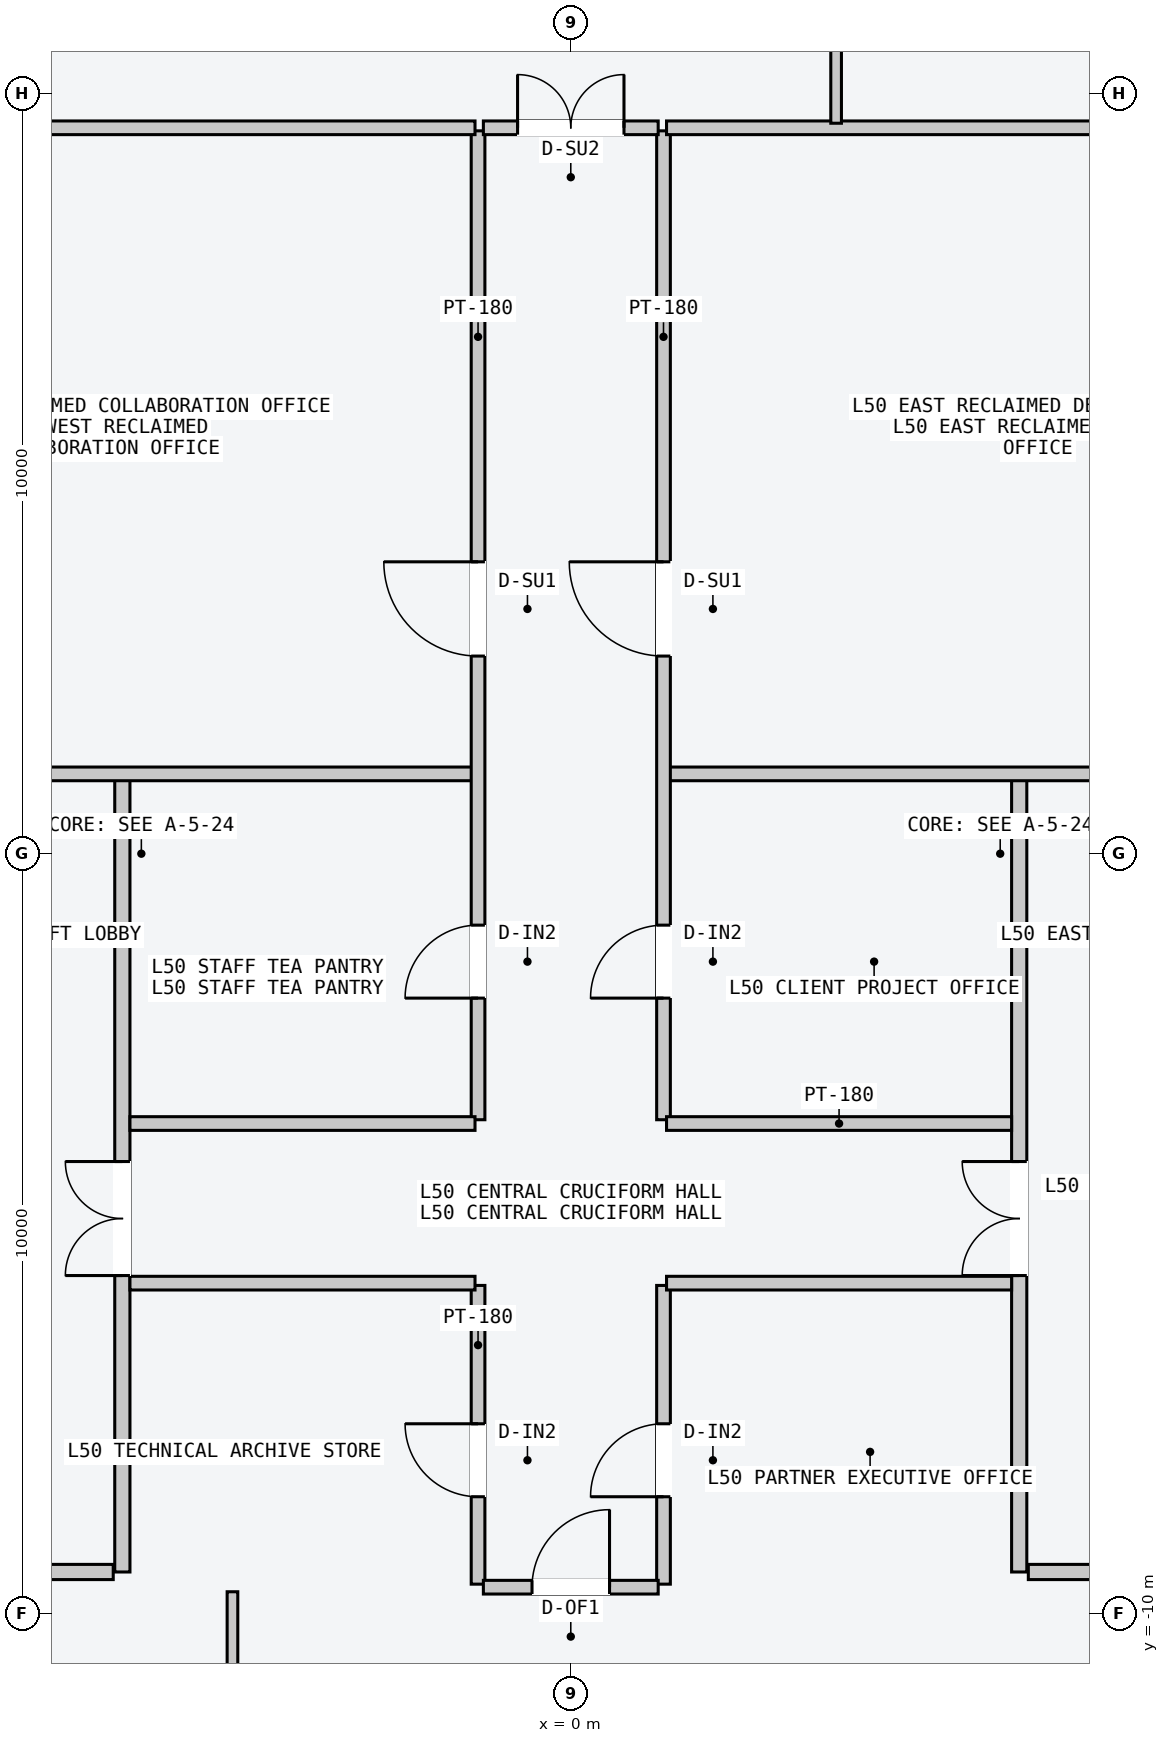
"""IFC4 building model, lengths in metres.
Left out: names, types, materials, properties, quantities, classifications, styles, units other than length and angle.
Written with IfcOpenShell. Run it as: python <this file> out.ifc"""

import sys

from ifc_helpers import new_model, si_unit, direction, frame, frame_2d, origin, place, context, subcontext, project, spatial, rectangle, extrude, element, fill, save


model = new_model("IFC4")
c1 = context("Model", 3, precision=1e-05, world=origin(), true_north=direction((0.0, 1.0)))
c2 = subcontext(c1, "Body", "Model", "MODEL_VIEW")
j1 = project(units=[si_unit("LENGTHUNIT", "METRE"), si_unit("PLANEANGLEUNIT", "RADIAN")], contexts=[c1])
p1 = place(None, origin())
s1 = spatial("IfcSite", under=j1, at=p1, CompositionType="ELEMENT")
p2 = place(p1, origin())
s2 = spatial("IfcBuilding", under=s1, at=p2, CompositionType="ELEMENT")
p3 = place(p2, frame((0.0, 0.0, 191.1)))
s3 = spatial("IfcBuildingStorey", under=s2, at=p3, CompositionType="ELEMENT", Elevation=191.1)
p4 = place(p3, frame((-5.9, -9.45, 0.0), z_axis=(0.0, 0.0, 1.0), x_axis=(0.0, 1.0, 0.0)))
e1 = element("IfcWall", 1, at=p4, inside=s3, PredefinedType="PARTITIONING", context=c2, shape_type="SweptSolid", body=[
    extrude(rectangle(XDim=10.5, YDim=0.2, at=frame_2d((5.25, 0.0))), origin(), (0.0, 0.0, 1.0), 3.4),
])
p5 = place(p4, frame((3.9, 0.0, 0.0)))
e2 = element("IfcOpeningElement", 2, at=p5, cuts=e1, PredefinedType="OPENING", context=c2, shape_type="SweptSolid", body=[
    extrude(rectangle(XDim=1.5, YDim=2.2, at=frame_2d((0.75, 1.1))), frame((0.0, 0.11, 0.0), z_axis=(0.0, -1.0, 0.0), x_axis=(1.0, 0.0, 0.0)), (0.0, 0.0, 1.0), 0.22),
])
p6 = place(p3, frame((-6.02, -9.45, 0.0), z_axis=(0.0, 0.0, 1.0), x_axis=(-1.0, 0.0, 0.0)))
e3 = element("IfcWall", 3, at=p6, inside=s3, PredefinedType="PARTITIONING", context=c2, shape_type="SweptSolid", body=[
    extrude(rectangle(XDim=1.8, YDim=0.2, at=frame_2d((0.9, 0.0))), origin(), (0.0, 0.0, 1.0), 3.4),
])
p7 = place(p3, frame((5.9, -9.45, 0.0), z_axis=(0.0, 0.0, 1.0), x_axis=(0.0, 1.0, 0.0)))
e4 = element("IfcWall", 4, at=p7, inside=s3, PredefinedType="PARTITIONING", context=c2, shape_type="SweptSolid", body=[
    extrude(rectangle(XDim=10.5, YDim=0.2, at=frame_2d((5.25, 0.0))), origin(), (0.0, 0.0, 1.0), 3.4),
])
p8 = place(p7, frame((3.9, 0.0, 0.0)))
e5 = element("IfcOpeningElement", 5, at=p8, cuts=e4, PredefinedType="OPENING", context=c2, shape_type="SweptSolid", body=[
    extrude(rectangle(XDim=1.5, YDim=2.2, at=frame_2d((0.75, 1.1))), frame((0.0, 0.11, 0.0), z_axis=(0.0, -1.0, 0.0), x_axis=(1.0, 0.0, 0.0)), (0.0, 0.0, 1.0), 0.22),
])
p9 = place(p3, frame((6.02, -9.45, 0.0), z_axis=(0.0, 0.0, 1.0), x_axis=(1.0, 0.0, 0.0)))
e6 = element("IfcWall", 6, at=p9, inside=s3, PredefinedType="PARTITIONING", context=c2, shape_type="SweptSolid", body=[
    extrude(rectangle(XDim=1.8, YDim=0.2, at=frame_2d((0.9, 0.0))), origin(), (0.0, 0.0, 1.0), 3.4),
])
p10 = place(p3, frame((-10.05, 1.05, 0.0), z_axis=(0.0, 0.0, 1.0), x_axis=(1.0, 0.0, 0.0)))
e7 = element("IfcWall", 7, at=p10, inside=s3, PredefinedType="PARTITIONING", context=c2, shape_type="SweptSolid", body=[
    extrude(rectangle(XDim=8.79, YDim=0.18, at=frame_2d((4.395, 0.0))), origin(), (0.0, 0.0, 1.0), 3.4),
])
p11 = place(p3, frame((-1.22, -3.5, 0.0), z_axis=(0.0, 0.0, 1.0), x_axis=(0.0, 1.0, 0.0)))
e8 = element("IfcWall", 8, at=p11, inside=s3, PredefinedType="PARTITIONING", context=c2, shape_type="SweptSolid", body=[
    extrude(rectangle(XDim=13.01, YDim=0.18, at=frame_2d((6.505, 0.0))), origin(), (0.0, 0.0, 1.0), 3.4),
])
p12 = place(p11, frame((6.1, 0.0, 0.0)))
e9 = element("IfcOpeningElement", 9, at=p12, cuts=e8, PredefinedType="OPENING", context=c2, shape_type="SweptSolid", body=[
    extrude(rectangle(XDim=1.24, YDim=2.24, at=frame_2d((0.62, 1.12))), frame((0.0, 0.1, 0.0), z_axis=(0.0, -1.0, 0.0), x_axis=(1.0, 0.0, 0.0)), (0.0, 0.0, 1.0), 0.2),
])
p13 = place(p11, frame((1.6, 0.0, 0.0)))
e10 = element("IfcOpeningElement", 10, at=p13, cuts=e8, PredefinedType="OPENING", context=c2, shape_type="SweptSolid", body=[
    extrude(rectangle(XDim=0.96, YDim=2.18, at=frame_2d((0.48, 1.09))), frame((0.0, 0.1, 0.0), z_axis=(0.0, -1.0, 0.0), x_axis=(1.0, 0.0, 0.0)), (0.0, 0.0, 1.0), 0.2),
])
p14 = place(p3, frame((-7.5, 9.55, 0.0), z_axis=(0.0, 0.0, 1.0), x_axis=(1.0, 0.0, 0.0)))
e11 = element("IfcWall", 11, at=p14, inside=s3, PredefinedType="PARTITIONING", context=c2, shape_type="SweptSolid", body=[
    extrude(rectangle(XDim=6.24, YDim=0.18, at=frame_2d((3.12, 0.0))), origin(), (0.0, 0.0, 1.0), 3.4),
])
p15 = place(p3, frame((-5.8, -3.55, 0.0), z_axis=(0.0, 0.0, 1.0), x_axis=(1.0, 0.0, 0.0)))
e12 = element("IfcWall", 12, at=p15, inside=s3, PredefinedType="PARTITIONING", context=c2, shape_type="SweptSolid", body=[
    extrude(rectangle(XDim=4.54, YDim=0.18, at=frame_2d((2.27, 0.0))), origin(), (0.0, 0.0, 1.0), 3.4),
])
p16 = place(p3, frame((1.26, 1.05, 0.0), z_axis=(0.0, 0.0, 1.0), x_axis=(1.0, 0.0, 0.0)))
e13 = element("IfcWall", 13, at=p16, inside=s3, PredefinedType="PARTITIONING", context=c2, shape_type="SweptSolid", body=[
    extrude(rectangle(XDim=8.8, YDim=0.18, at=frame_2d((4.4, 0.0))), origin(), (0.0, 0.0, 1.0), 3.4),
])
p17 = place(p3, frame((1.22, -3.5, 0.0), z_axis=(0.0, 0.0, 1.0), x_axis=(0.0, 1.0, 0.0)))
e14 = element("IfcWall", 14, at=p17, inside=s3, PredefinedType="PARTITIONING", context=c2, shape_type="SweptSolid", body=[
    extrude(rectangle(XDim=13.01, YDim=0.18, at=frame_2d((6.505, 0.0))), origin(), (0.0, 0.0, 1.0), 3.4),
])
p18 = place(p17, frame((6.1, 0.0, 0.0)))
e15 = element("IfcOpeningElement", 15, at=p18, cuts=e14, PredefinedType="OPENING", context=c2, shape_type="SweptSolid", body=[
    extrude(rectangle(XDim=1.24, YDim=2.24, at=frame_2d((0.62, 1.12))), frame((0.0, 0.1, 0.0), z_axis=(0.0, -1.0, 0.0), x_axis=(1.0, 0.0, 0.0)), (0.0, 0.0, 1.0), 0.2),
])
p19 = place(p17, frame((1.6, 0.0, 0.0)))
e16 = element("IfcOpeningElement", 16, at=p19, cuts=e14, PredefinedType="OPENING", context=c2, shape_type="SweptSolid", body=[
    extrude(rectangle(XDim=0.96, YDim=2.18, at=frame_2d((0.48, 1.09))), frame((0.0, 0.1, 0.0), z_axis=(0.0, -1.0, 0.0), x_axis=(1.0, 0.0, 0.0)), (0.0, 0.0, 1.0), 0.2),
])
p20 = place(p3, frame((1.26, 9.55, 0.0), z_axis=(0.0, 0.0, 1.0), x_axis=(1.0, 0.0, 0.0)))
e17 = element("IfcWall", 17, at=p20, inside=s3, PredefinedType="PARTITIONING", context=c2, shape_type="SweptSolid", body=[
    extrude(rectangle(XDim=6.24, YDim=0.18, at=frame_2d((3.12, 0.0))), origin(), (0.0, 0.0, 1.0), 3.4),
])
p21 = place(p3, frame((1.26, -3.55, 0.0), z_axis=(0.0, 0.0, 1.0), x_axis=(1.0, 0.0, 0.0)))
e18 = element("IfcWall", 18, at=p21, inside=s3, PredefinedType="PARTITIONING", context=c2, shape_type="SweptSolid", body=[
    extrude(rectangle(XDim=4.54, YDim=0.18, at=frame_2d((2.27, 0.0))), origin(), (0.0, 0.0, 1.0), 3.4),
])
p22 = place(p3, frame((-1.22, -9.61, 0.0), z_axis=(0.0, 0.0, 1.0), x_axis=(0.0, 1.0, 0.0)))
e19 = element("IfcWall", 19, at=p22, inside=s3, PredefinedType="PARTITIONING", context=c2, shape_type="SweptSolid", body=[
    extrude(rectangle(XDim=3.93, YDim=0.18, at=frame_2d((1.965, 0.0))), origin(), (0.0, 0.0, 1.0), 3.4),
])
p23 = place(p22, frame((1.15, 0.0, 0.0)))
e20 = element("IfcOpeningElement", 20, at=p23, cuts=e19, PredefinedType="OPENING", context=c2, shape_type="SweptSolid", body=[
    extrude(rectangle(XDim=0.96, YDim=2.18, at=frame_2d((0.48, 1.09))), frame((0.0, 0.1, 0.0), z_axis=(0.0, -1.0, 0.0), x_axis=(1.0, 0.0, 0.0)), (0.0, 0.0, 1.0), 0.2),
])
p24 = place(p3, frame((1.22, -9.61, 0.0), z_axis=(0.0, 0.0, 1.0), x_axis=(0.0, 1.0, 0.0)))
e21 = element("IfcWall", 21, at=p24, inside=s3, PredefinedType="PARTITIONING", context=c2, shape_type="SweptSolid", body=[
    extrude(rectangle(XDim=3.93, YDim=0.18, at=frame_2d((1.965, 0.0))), origin(), (0.0, 0.0, 1.0), 3.4),
])
p25 = place(p24, frame((1.15, 0.0, 0.0)))
e22 = element("IfcOpeningElement", 22, at=p25, cuts=e21, PredefinedType="OPENING", context=c2, shape_type="SweptSolid", body=[
    extrude(rectangle(XDim=0.96, YDim=2.18, at=frame_2d((0.48, 1.09))), frame((0.0, 0.1, 0.0), z_axis=(0.0, -1.0, 0.0), x_axis=(1.0, 0.0, 0.0)), (0.0, 0.0, 1.0), 0.2),
])
for number, where, z_axis, x_axis in (
    (23, (-5.8, -5.65, 0.0), (0.0, 0.0, 1.0), (1.0, 0.0, 0.0)),
    (24, (1.26, -5.65, 0.0), (0.0, 0.0, 1.0), (1.0, 0.0, 0.0)),
):
    element("IfcWall", number, at=place(p3, frame(where, z_axis=z_axis, x_axis=x_axis)), inside=s3, PredefinedType="PARTITIONING", context=c2, shape_type="SweptSolid", body=[
        extrude(rectangle(XDim=4.54, YDim=0.18, at=frame_2d((2.27, 0.0))), origin(), (0.0, 0.0, 1.0), 3.4),
    ])
p26 = place(p3, frame((3.491, 9.61, 0.0), z_axis=(0.0, 0.0, 1.0), x_axis=(0.0, 1.0, 0.0)))
e25 = element("IfcWall", 25, at=p26, inside=s3, PredefinedType="PARTITIONING", context=c2, shape_type="SweptSolid", body=[
    extrude(rectangle(XDim=8.95, YDim=0.14, at=frame_2d((4.475, 0.0))), origin(), (0.0, 0.0, 1.0), 3.4),
])
p27 = place(p26, frame((1.15, 0.0, 0.0)))
e26 = element("IfcOpeningElement", 26, at=p27, cuts=e25, PredefinedType="OPENING", context=c2, shape_type="SweptSolid", body=[
    extrude(rectangle(XDim=0.96, YDim=2.18, at=frame_2d((0.48, 1.09))), frame((0.0, 0.08, 0.0), z_axis=(0.0, -1.0, 0.0), x_axis=(1.0, 0.0, 0.0)), (0.0, 0.0, 1.0), 0.16),
])
p28 = place(p3, frame((-1.15, 9.55, 0.0), z_axis=(0.0, 0.0, 1.0), x_axis=(1.0, 0.0, 0.0)))
e27 = element("IfcWall", 27, at=p28, inside=s3, PredefinedType="PARTITIONING", context=c2, shape_type="SweptSolid", body=[
    extrude(rectangle(XDim=2.3, YDim=0.18, at=frame_2d((1.15, 0.0))), origin(), (0.0, 0.0, 1.0), 3.4),
])
p29 = place(p28, frame((0.45, 0.0, 0.0)))
e28 = element("IfcOpeningElement", 28, at=p29, cuts=e27, PredefinedType="OPENING", context=c2, shape_type="SweptSolid", body=[
    extrude(rectangle(XDim=1.4, YDim=2.2, at=frame_2d((0.7, 1.1))), frame((0.0, 0.1, 0.0), z_axis=(0.0, -1.0, 0.0), x_axis=(1.0, 0.0, 0.0)), (0.0, 0.0, 1.0), 0.2),
])
p30 = place(p3, frame((-4.451, -18.56, 0.0), z_axis=(0.0, 0.0, 1.0), x_axis=(0.0, 1.0, 0.0)))
e29 = element("IfcWall", 29, at=p30, inside=s3, PredefinedType="PARTITIONING", context=c2, shape_type="SweptSolid", body=[
    extrude(rectangle(XDim=8.85, YDim=0.14, at=frame_2d((4.425, 0.0))), origin(), (0.0, 0.0, 1.0), 3.4),
])
p31 = place(p30, frame((1.05, 0.0, 0.0)))
e30 = element("IfcOpeningElement", 30, at=p31, cuts=e29, PredefinedType="OPENING", context=c2, shape_type="SweptSolid", body=[
    extrude(rectangle(XDim=0.96, YDim=2.18, at=frame_2d((0.48, 1.09))), frame((0.0, 0.08, 0.0), z_axis=(0.0, -1.0, 0.0), x_axis=(1.0, 0.0, 0.0)), (0.0, 0.0, 1.0), 0.16),
])
p32 = place(p3, frame((-1.15, -9.65, 0.0), z_axis=(0.0, 0.0, 1.0), x_axis=(1.0, 0.0, 0.0)))
e31 = element("IfcWall", 31, at=p32, inside=s3, PredefinedType="PARTITIONING", context=c2, shape_type="SweptSolid", body=[
    extrude(rectangle(XDim=2.3, YDim=0.18, at=frame_2d((1.15, 0.0))), origin(), (0.0, 0.0, 1.0), 2.75),
])
p33 = place(p32, frame((0.64, 0.0, 0.0)))
e32 = element("IfcOpeningElement", 32, at=p33, cuts=e31, PredefinedType="OPENING", context=c2, shape_type="SweptSolid", body=[
    extrude(rectangle(XDim=1.02, YDim=2.2, at=frame_2d((0.51, 1.1))), frame((0.0, 0.1, 0.0), z_axis=(0.0, -1.0, 0.0), x_axis=(1.0, 0.0, 0.0)), (0.0, 0.0, 1.0), 0.2),
])
p34 = place(p5, origin())
e33 = element("IfcDoor", 33, at=p34, inside=s3, OperationType="DOUBLE_DOOR_SINGLE_SWING", PredefinedType="DOOR", context=c2, shape_type="SweptSolid", body=[
    extrude(rectangle(XDim=1.5, YDim=2.2, at=frame_2d((0.75, 1.1))), frame((0.0, 0.025, 0.0), z_axis=(0.0, -1.0, 0.0), x_axis=(1.0, 0.0, 0.0)), (0.0, 0.0, 1.0), 0.05),
])
fill(e2, e33)
p35 = place(p8, origin())
e34 = element("IfcDoor", 34, at=p35, inside=s3, OperationType="DOUBLE_DOOR_SINGLE_SWING", PredefinedType="DOOR", context=c2, shape_type="SweptSolid", body=[
    extrude(rectangle(XDim=1.5, YDim=2.2, at=frame_2d((0.75, 1.1))), frame((0.0, 0.025, 0.0), z_axis=(0.0, -1.0, 0.0), x_axis=(1.0, 0.0, 0.0)), (0.0, 0.0, 1.0), 0.05),
])
fill(e5, e34)
p36 = place(p12, origin())
e35 = element("IfcDoor", 35, at=p36, inside=s3, OperationType="SINGLE_SWING_RIGHT", PredefinedType="DOOR", context=c2, shape_type="SweptSolid", body=[
    extrude(rectangle(XDim=1.24, YDim=2.24, at=frame_2d((0.62, 1.12))), frame((0.0, 0.025, 0.0), z_axis=(0.0, -1.0, 0.0), x_axis=(1.0, 0.0, 0.0)), (0.0, 0.0, 1.0), 0.05),
])
fill(e9, e35)
p37 = place(p13, origin())
e36 = element("IfcDoor", 36, at=p37, inside=s3, OperationType="SINGLE_SWING_LEFT", PredefinedType="DOOR", context=c2, shape_type="SweptSolid", body=[
    extrude(rectangle(XDim=0.96, YDim=2.18, at=frame_2d((0.48, 1.09))), frame((0.0, 0.025, 0.0), z_axis=(0.0, -1.0, 0.0), x_axis=(1.0, 0.0, 0.0)), (0.0, 0.0, 1.0), 0.05),
])
fill(e10, e36)
p38 = place(p18, origin())
e37 = element("IfcDoor", 37, at=p38, inside=s3, OperationType="SINGLE_SWING_RIGHT", PredefinedType="DOOR", context=c2, shape_type="SweptSolid", body=[
    extrude(rectangle(XDim=1.24, YDim=2.24, at=frame_2d((0.62, 1.12))), frame((0.0, 0.025, 0.0), z_axis=(0.0, -1.0, 0.0), x_axis=(1.0, 0.0, 0.0)), (0.0, 0.0, 1.0), 0.05),
])
fill(e15, e37)
p39 = place(p19, origin())
e38 = element("IfcDoor", 38, at=p39, inside=s3, OperationType="SINGLE_SWING_LEFT", PredefinedType="DOOR", context=c2, shape_type="SweptSolid", body=[
    extrude(rectangle(XDim=0.96, YDim=2.18, at=frame_2d((0.48, 1.09))), frame((0.0, 0.025, 0.0), z_axis=(0.0, -1.0, 0.0), x_axis=(1.0, 0.0, 0.0)), (0.0, 0.0, 1.0), 0.05),
])
fill(e16, e38)
p40 = place(p23, origin())
e39 = element("IfcDoor", 39, at=p40, inside=s3, OperationType="SINGLE_SWING_RIGHT", PredefinedType="DOOR", context=c2, shape_type="SweptSolid", body=[
    extrude(rectangle(XDim=0.96, YDim=2.18, at=frame_2d((0.48, 1.09))), frame((0.0, 0.025, 0.0), z_axis=(0.0, -1.0, 0.0), x_axis=(1.0, 0.0, 0.0)), (0.0, 0.0, 1.0), 0.05),
])
fill(e20, e39)
p41 = place(p25, origin())
e40 = element("IfcDoor", 40, at=p41, inside=s3, OperationType="SINGLE_SWING_LEFT", PredefinedType="DOOR", context=c2, shape_type="SweptSolid", body=[
    extrude(rectangle(XDim=0.96, YDim=2.18, at=frame_2d((0.48, 1.09))), frame((0.0, 0.025, 0.0), z_axis=(0.0, -1.0, 0.0), x_axis=(1.0, 0.0, 0.0)), (0.0, 0.0, 1.0), 0.05),
])
fill(e22, e40)
p42 = place(p29, origin())
e41 = element("IfcDoor", 41, at=p42, inside=s3, OperationType="DOUBLE_DOOR_SINGLE_SWING", PredefinedType="DOOR", context=c2, shape_type="SweptSolid", body=[
    extrude(rectangle(XDim=1.4, YDim=2.2, at=frame_2d((0.7, 1.1))), frame((0.0, 0.025, 0.0), z_axis=(0.0, -1.0, 0.0), x_axis=(1.0, 0.0, 0.0)), (0.0, 0.0, 1.0), 0.05),
])
fill(e28, e41)
p43 = place(p33, origin())
e42 = element("IfcDoor", 42, at=p43, inside=s3, OperationType="SINGLE_SWING_RIGHT", PredefinedType="DOOR", context=c2, shape_type="SweptSolid", body=[
    extrude(rectangle(XDim=1.02, YDim=2.2, at=frame_2d((0.51, 1.1))), frame((0.0, 0.025, 0.0), z_axis=(0.0, -1.0, 0.0), x_axis=(1.0, 0.0, 0.0)), (0.0, 0.0, 1.0), 0.05),
])
fill(e32, e42)
save(model, sys.argv[1])
